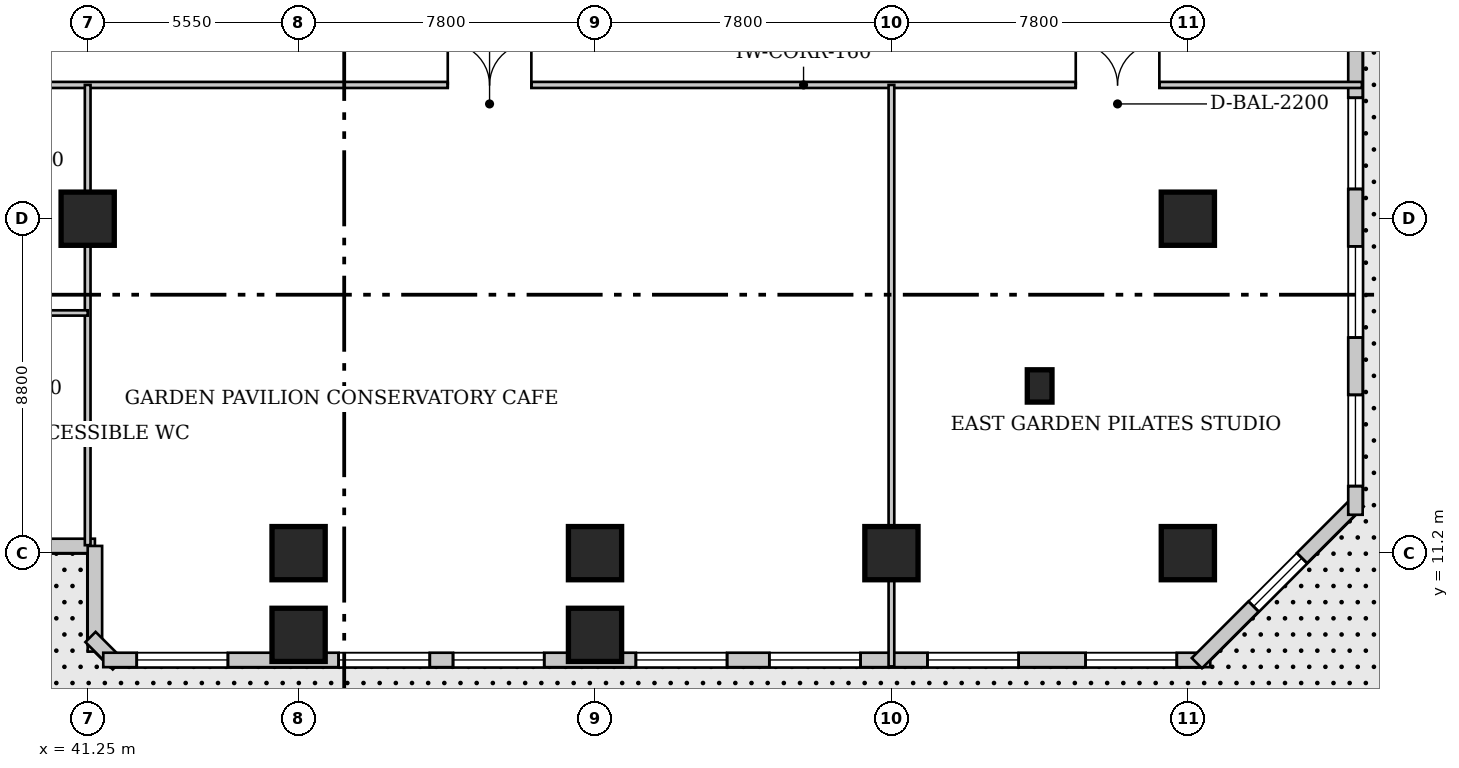
"""IFC4 building model, lengths in metres.
Left out: names, types, materials, properties, quantities, classifications, styles, units other than length and angle.
Written with IfcOpenShell. Run it as: python <this file> out.ifc"""

import sys

from ifc_helpers import new_model, si_unit, direction, frame, frame_2d, origin, origin_2d, place, context, subcontext, project, spatial, rectangle, extrude, element, fill, save


model = new_model("IFC4")
c1 = context("Model", 3, precision=1e-05, world=origin(), true_north=direction((0.0, 1.0)))
c2 = subcontext(c1, "Body", "Model", "MODEL_VIEW")
j1 = project(units=[si_unit("LENGTHUNIT", "METRE"), si_unit("PLANEANGLEUNIT", "RADIAN")], contexts=[c1])
p1 = place(None, origin())
s1 = spatial("IfcSite", under=j1, at=p1, CompositionType="ELEMENT")
p2 = place(p1, origin())
s2 = spatial("IfcBuilding", under=s1, at=p2, CompositionType="ELEMENT")
p3 = place(p2, frame((0.0, 0.0, 20.8)))
s3 = spatial("IfcBuildingStorey", under=s2, at=p3, CompositionType="ELEMENT", Elevation=20.8)
for number, where, z_axis, x_axis in (
    (1, (41.25, 20.0, 0.0), (0.0, 0.0, 1.0), (1.0, 0.0, 0.0)),
    (2, (46.8, 11.2, 0.0), (0.0, 0.0, 1.0), (1.0, 0.0, 0.0)),
    (3, (54.6, 11.2, 0.0), (0.0, 0.0, 1.0), (1.0, 0.0, 0.0)),
    (4, (62.4, 11.2, 0.0), (0.0, 0.0, 1.0), (1.0, 0.0, 0.0)),
    (5, (70.2, 11.2, 0.0), (0.0, 0.0, 1.0), (1.0, 0.0, 0.0)),
    (6, (70.2, 20.0, 0.0), (0.0, 0.0, 1.0), (1.0, 0.0, 0.0)),
    (7, (46.8, 9.05, 0.0), (0.0, 0.0, 1.0), (1.0, 0.0, 0.0)),
    (8, (54.6, 9.05, 0.0), (0.0, 0.0, 1.0), (1.0, 0.0, 0.0)),
):
    element("IfcColumn", number, at=place(p3, frame(where, z_axis=z_axis, x_axis=x_axis)), inside=s3, PredefinedType="COLUMN", context=c2, shape_type="SweptSolid", body=[
        extrude(rectangle(XDim=1.4, YDim=1.4, at=origin_2d()), origin(), (0.0, 0.0, 1.0), 5.2),
    ])
p4 = place(p3, frame((66.3, 15.6, 0.0), z_axis=(0.0, 0.0, 1.0), x_axis=(1.0, 0.0, 0.0)))
e9 = element("IfcColumn", 9, at=p4, inside=s3, PredefinedType="PILASTER", context=c2, shape_type="SweptSolid", body=[
    extrude(rectangle(XDim=0.65, YDim=0.85, at=origin_2d()), origin(), (0.0, 0.0, 1.0), 5.2),
])
p5 = place(p3, frame((36.56, 11.39, 0.0), z_axis=(0.0, 0.0, 1.0), x_axis=(1.0, 0.0, 0.0)))
e10 = element("IfcWall", 10, at=p5, inside=s3, PredefinedType="SOLIDWALL", context=c2, shape_type="SweptSolid", body=[
    extrude(rectangle(XDim=4.88, YDim=0.38, at=frame_2d((2.44, 0.0))), origin(), (0.0, 0.0, 1.0), 4.94),
])
p6 = place(p5, frame((1.54, 0.0, 0.8)))
e11 = element("IfcOpeningElement", 11, at=p6, cuts=e10, PredefinedType="OPENING", context=c2, shape_type="SweptSolid", body=[
    extrude(rectangle(XDim=1.8, YDim=2.1, at=frame_2d((0.9, 1.05))), frame((0.0, 0.2, 0.0), z_axis=(0.0, -1.0, 0.0), x_axis=(1.0, 0.0, 0.0)), (0.0, 0.0, 1.0), 0.4),
])
p7 = place(p3, frame((41.44, 11.39, 0.0), z_axis=(0.0, 0.0, 1.0), x_axis=(0.0, -1.0, 0.0)))
e12 = element("IfcWall", 12, at=p7, inside=s3, PredefinedType="SOLIDWALL", context=c2, shape_type="SweptSolid", body=[
    extrude(rectangle(XDim=2.78, YDim=0.38, at=frame_2d((1.39, 0.0))), origin(), (0.0, 0.0, 1.0), 4.94),
])
p8 = place(p3, frame((41.324, 8.994, 0.0), z_axis=(0.0, 0.0, 1.0), x_axis=(0.707106781187, -0.707106781187, 0.0)))
e13 = element("IfcWall", 13, at=p8, inside=s3, PredefinedType="SOLIDWALL", context=c2, shape_type="SweptSolid", body=[
    extrude(rectangle(XDim=1.019, YDim=0.38, at=frame_2d((0.509, 0.0))), origin(), (0.0, 0.0, 1.0), 4.94),
])
p9 = place(p3, frame((41.66, 8.39, 0.0), z_axis=(0.0, 0.0, 1.0), x_axis=(1.0, 0.0, 0.0)))
e14 = element("IfcWall", 14, at=p9, inside=s3, PredefinedType="SOLIDWALL", context=c2, shape_type="SweptSolid", body=[
    extrude(rectangle(XDim=29.13, YDim=0.38, at=frame_2d((14.565, 0.0))), origin(), (0.0, 0.0, 1.0), 4.94),
])
p10 = place(p9, frame((0.881, 0.0, 0.75)))
e15 = element("IfcOpeningElement", 15, at=p10, cuts=e14, PredefinedType="OPENING", context=c2, shape_type="SweptSolid", body=[
    extrude(rectangle(XDim=2.4, YDim=2.2, at=frame_2d((1.2, 1.1))), frame((0.0, 0.2, 0.0), z_axis=(0.0, -1.0, 0.0), x_axis=(1.0, 0.0, 0.0)), (0.0, 0.0, 1.0), 0.4),
])
p11 = place(p9, frame((6.192, 0.0, 0.75)))
e16 = element("IfcOpeningElement", 16, at=p11, cuts=e14, PredefinedType="OPENING", context=c2, shape_type="SweptSolid", body=[
    extrude(rectangle(XDim=2.4, YDim=2.2, at=frame_2d((1.2, 1.1))), frame((0.0, 0.2, 0.0), z_axis=(0.0, -1.0, 0.0), x_axis=(1.0, 0.0, 0.0)), (0.0, 0.0, 1.0), 0.4),
])
p12 = place(p9, frame((9.204, 0.0, 0.75)))
e17 = element("IfcOpeningElement", 17, at=p12, cuts=e14, PredefinedType="OPENING", context=c2, shape_type="SweptSolid", body=[
    extrude(rectangle(XDim=2.4, YDim=2.2, at=frame_2d((1.2, 1.1))), frame((0.0, 0.2, 0.0), z_axis=(0.0, -1.0, 0.0), x_axis=(1.0, 0.0, 0.0)), (0.0, 0.0, 1.0), 0.4),
])
p13 = place(p9, frame((14.015, 0.0, 0.75)))
e18 = element("IfcOpeningElement", 18, at=p13, cuts=e14, PredefinedType="OPENING", context=c2, shape_type="SweptSolid", body=[
    extrude(rectangle(XDim=2.4, YDim=2.2, at=frame_2d((1.2, 1.1))), frame((0.0, 0.2, 0.0), z_axis=(0.0, -1.0, 0.0), x_axis=(1.0, 0.0, 0.0)), (0.0, 0.0, 1.0), 0.4),
])
p14 = place(p9, frame((17.526, 0.0, 0.75)))
e19 = element("IfcOpeningElement", 19, at=p14, cuts=e14, PredefinedType="OPENING", context=c2, shape_type="SweptSolid", body=[
    extrude(rectangle(XDim=2.4, YDim=2.2, at=frame_2d((1.2, 1.1))), frame((0.0, 0.2, 0.0), z_axis=(0.0, -1.0, 0.0), x_axis=(1.0, 0.0, 0.0)), (0.0, 0.0, 1.0), 0.4),
])
p15 = place(p9, frame((21.688, 0.0, 0.75)))
e20 = element("IfcOpeningElement", 20, at=p15, cuts=e14, PredefinedType="OPENING", context=c2, shape_type="SweptSolid", body=[
    extrude(rectangle(XDim=2.4, YDim=2.2, at=frame_2d((1.2, 1.1))), frame((0.0, 0.2, 0.0), z_axis=(0.0, -1.0, 0.0), x_axis=(1.0, 0.0, 0.0)), (0.0, 0.0, 1.0), 0.4),
])
p16 = place(p9, frame((25.849, 0.0, 0.75)))
e21 = element("IfcOpeningElement", 21, at=p16, cuts=e14, PredefinedType="OPENING", context=c2, shape_type="SweptSolid", body=[
    extrude(rectangle(XDim=2.4, YDim=2.2, at=frame_2d((1.2, 1.1))), frame((0.0, 0.2, 0.0), z_axis=(0.0, -1.0, 0.0), x_axis=(1.0, 0.0, 0.0)), (0.0, 0.0, 1.0), 0.4),
])
p17 = place(p3, frame((70.438, 8.306, 0.0), z_axis=(0.0, 0.0, 1.0), x_axis=(0.707106781187, 0.707106781187, 0.0)))
e22 = element("IfcWall", 22, at=p17, inside=s3, PredefinedType="SOLIDWALL", context=c2, shape_type="SweptSolid", body=[
    extrude(rectangle(XDim=6.019, YDim=0.38, at=frame_2d((3.01, 0.0))), origin(), (0.0, 0.0, 1.0), 4.94),
])
p18 = place(p17, frame((2.11, 0.0, 0.8)))
e23 = element("IfcOpeningElement", 23, at=p18, cuts=e22, PredefinedType="OPENING", context=c2, shape_type="SweptSolid", body=[
    extrude(rectangle(XDim=1.8, YDim=2.1, at=frame_2d((0.9, 1.05))), frame((0.0, 0.2, 0.0), z_axis=(0.0, -1.0, 0.0), x_axis=(1.0, 0.0, 0.0)), (0.0, 0.0, 1.0), 0.4),
])
p19 = place(p3, frame((74.61, 12.21, 0.0), z_axis=(0.0, 0.0, 1.0), x_axis=(0.0, 1.0, 0.0)))
e24 = element("IfcWall", 24, at=p19, inside=s3, PredefinedType="SOLIDWALL", context=c2, shape_type="SweptSolid", body=[
    extrude(rectangle(XDim=35.18, YDim=0.38, at=frame_2d((17.59, 0.0))), origin(), (0.0, 0.0, 1.0), 4.94),
])
p20 = place(p19, frame((0.754, 0.0, 0.75)))
e25 = element("IfcOpeningElement", 25, at=p20, cuts=e24, PredefinedType="OPENING", context=c2, shape_type="SweptSolid", body=[
    extrude(rectangle(XDim=2.4, YDim=2.2, at=frame_2d((1.2, 1.1))), frame((0.0, 0.2, 0.0), z_axis=(0.0, -1.0, 0.0), x_axis=(1.0, 0.0, 0.0)), (0.0, 0.0, 1.0), 0.4),
])
p21 = place(p19, frame((4.663, 0.0, 0.75)))
e26 = element("IfcOpeningElement", 26, at=p21, cuts=e24, PredefinedType="OPENING", context=c2, shape_type="SweptSolid", body=[
    extrude(rectangle(XDim=2.4, YDim=2.2, at=frame_2d((1.2, 1.1))), frame((0.0, 0.2, 0.0), z_axis=(0.0, -1.0, 0.0), x_axis=(1.0, 0.0, 0.0)), (0.0, 0.0, 1.0), 0.4),
])
p22 = place(p19, frame((8.572, 0.0, 0.75)))
e27 = element("IfcOpeningElement", 27, at=p22, cuts=e24, PredefinedType="OPENING", context=c2, shape_type="SweptSolid", body=[
    extrude(rectangle(XDim=2.4, YDim=2.2, at=frame_2d((1.2, 1.1))), frame((0.0, 0.2, 0.0), z_axis=(0.0, -1.0, 0.0), x_axis=(1.0, 0.0, 0.0)), (0.0, 0.0, 1.0), 0.4),
])
p23 = place(p19, frame((16.39, 0.0, 0.75)))
e28 = element("IfcOpeningElement", 28, at=p23, cuts=e24, PredefinedType="OPENING", context=c2, shape_type="SweptSolid", body=[
    extrude(rectangle(XDim=2.4, YDim=2.2, at=frame_2d((1.2, 1.1))), frame((0.0, 0.2, 0.0), z_axis=(0.0, -1.0, 0.0), x_axis=(1.0, 0.0, 0.0)), (0.0, 0.0, 1.0), 0.4),
])
p24 = place(p19, frame((20.299, 0.0, 0.75)))
e29 = element("IfcOpeningElement", 29, at=p24, cuts=e24, PredefinedType="OPENING", context=c2, shape_type="SweptSolid", body=[
    extrude(rectangle(XDim=2.4, YDim=2.2, at=frame_2d((1.2, 1.1))), frame((0.0, 0.2, 0.0), z_axis=(0.0, -1.0, 0.0), x_axis=(1.0, 0.0, 0.0)), (0.0, 0.0, 1.0), 0.4),
])
p25 = place(p19, frame((24.208, 0.0, 0.75)))
e30 = element("IfcOpeningElement", 30, at=p25, cuts=e24, PredefinedType="OPENING", context=c2, shape_type="SweptSolid", body=[
    extrude(rectangle(XDim=2.4, YDim=2.2, at=frame_2d((1.2, 1.1))), frame((0.0, 0.2, 0.0), z_axis=(0.0, -1.0, 0.0), x_axis=(1.0, 0.0, 0.0)), (0.0, 0.0, 1.0), 0.4),
])
p26 = place(p19, frame((28.117, 0.0, 0.75)))
e31 = element("IfcOpeningElement", 31, at=p26, cuts=e24, PredefinedType="OPENING", context=c2, shape_type="SweptSolid", body=[
    extrude(rectangle(XDim=2.4, YDim=2.2, at=frame_2d((1.2, 1.1))), frame((0.0, 0.2, 0.0), z_axis=(0.0, -1.0, 0.0), x_axis=(1.0, 0.0, 0.0)), (0.0, 0.0, 1.0), 0.4),
])
p27 = place(p19, frame((32.026, 0.0, 0.75)))
e32 = element("IfcOpeningElement", 32, at=p27, cuts=e24, PredefinedType="OPENING", context=c2, shape_type="SweptSolid", body=[
    extrude(rectangle(XDim=2.4, YDim=2.2, at=frame_2d((1.2, 1.1))), frame((0.0, 0.2, 0.0), z_axis=(0.0, -1.0, 0.0), x_axis=(1.0, 0.0, 0.0)), (0.0, 0.0, 1.0), 0.4),
])
p28 = place(p3, frame((3.22, 23.52, 0.0), z_axis=(0.0, 0.0, 1.0), x_axis=(1.0, 0.0, 0.0)))
e33 = element("IfcWall", 33, at=p28, inside=s3, PredefinedType="PARTITIONING", context=c2, shape_type="SweptSolid", body=[
    extrude(rectangle(XDim=71.56, YDim=0.16, at=frame_2d((35.78, 0.0))), origin(), (0.0, 0.0, 1.0), 4.94),
])
p29 = place(p28, frame((2.19, 0.0, 0.0)))
e34 = element("IfcOpeningElement", 34, at=p29, cuts=e33, PredefinedType="OPENING", context=c2, shape_type="SweptSolid", body=[
    extrude(rectangle(XDim=1.0, YDim=2.15, at=frame_2d((0.5, 1.075))), frame((0.0, 0.09, 0.0), z_axis=(0.0, -1.0, 0.0), x_axis=(1.0, 0.0, 0.0)), (0.0, 0.0, 1.0), 0.18),
])
p30 = place(p28, frame((5.76, 0.0, 0.0)))
e35 = element("IfcOpeningElement", 35, at=p30, cuts=e33, PredefinedType="OPENING", context=c2, shape_type="SweptSolid", body=[
    extrude(rectangle(XDim=1.1, YDim=2.15, at=frame_2d((0.55, 1.075))), frame((0.0, 0.09, 0.0), z_axis=(0.0, -1.0, 0.0), x_axis=(1.0, 0.0, 0.0)), (0.0, 0.0, 1.0), 0.18),
])
p31 = place(p28, frame((9.005, 0.0, 0.0)))
e36 = element("IfcOpeningElement", 36, at=p31, cuts=e33, PredefinedType="OPENING", context=c2, shape_type="SweptSolid", body=[
    extrude(rectangle(XDim=0.95, YDim=2.1, at=frame_2d((0.475, 1.05))), frame((0.0, 0.09, 0.0), z_axis=(0.0, -1.0, 0.0), x_axis=(1.0, 0.0, 0.0)), (0.0, 0.0, 1.0), 0.18),
])
p32 = place(p28, frame((20.43, 0.0, 0.0)))
e37 = element("IfcOpeningElement", 37, at=p32, cuts=e33, PredefinedType="OPENING", context=c2, shape_type="SweptSolid", body=[
    extrude(rectangle(XDim=2.2, YDim=2.4, at=frame_2d((1.1, 1.2))), frame((0.0, 0.09, 0.0), z_axis=(0.0, -1.0, 0.0), x_axis=(1.0, 0.0, 0.0)), (0.0, 0.0, 1.0), 0.18),
])
p33 = place(p28, frame((29.055, 0.0, 0.0)))
e38 = element("IfcOpeningElement", 38, at=p33, cuts=e33, PredefinedType="OPENING", context=c2, shape_type="SweptSolid", body=[
    extrude(rectangle(XDim=2.2, YDim=2.4, at=frame_2d((1.1, 1.2))), frame((0.0, 0.09, 0.0), z_axis=(0.0, -1.0, 0.0), x_axis=(1.0, 0.0, 0.0)), (0.0, 0.0, 1.0), 0.18),
])
p34 = place(p28, frame((47.505, 0.0, 0.0)))
e39 = element("IfcOpeningElement", 39, at=p34, cuts=e33, PredefinedType="OPENING", context=c2, shape_type="SweptSolid", body=[
    extrude(rectangle(XDim=2.2, YDim=2.4, at=frame_2d((1.1, 1.2))), frame((0.0, 0.09, 0.0), z_axis=(0.0, -1.0, 0.0), x_axis=(1.0, 0.0, 0.0)), (0.0, 0.0, 1.0), 0.18),
])
p35 = place(p28, frame((64.03, 0.0, 0.0)))
e40 = element("IfcOpeningElement", 40, at=p35, cuts=e33, PredefinedType="OPENING", context=c2, shape_type="SweptSolid", body=[
    extrude(rectangle(XDim=2.2, YDim=2.4, at=frame_2d((1.1, 1.2))), frame((0.0, 0.09, 0.0), z_axis=(0.0, -1.0, 0.0), x_axis=(1.0, 0.0, 0.0)), (0.0, 0.0, 1.0), 0.18),
])
p36 = place(p28, frame((35.34, 0.0, 0.0)))
e41 = element("IfcOpeningElement", 41, at=p36, cuts=e33, PredefinedType="OPENING", context=c2, shape_type="SweptSolid", body=[
    extrude(rectangle(XDim=0.88, YDim=2.05, at=frame_2d((0.44, 1.025))), frame((0.0, 0.09, 0.0), z_axis=(0.0, -1.0, 0.0), x_axis=(1.0, 0.0, 0.0)), (0.0, 0.0, 1.0), 0.18),
])
p37 = place(p3, frame((41.25, 11.41, 0.0), z_axis=(0.0, 0.0, 1.0), x_axis=(0.0, 1.0, 0.0)))
e42 = element("IfcWall", 42, at=p37, inside=s3, PredefinedType="PARTITIONING", context=c2, shape_type="SweptSolid", body=[
    extrude(rectangle(XDim=12.11, YDim=0.15, at=frame_2d((6.055, 0.0))), origin(), (0.0, 0.0, 1.0), 4.94),
])
p38 = place(p3, frame((62.4, 8.22, 0.0), z_axis=(0.0, 0.0, 1.0), x_axis=(0.0, 1.0, 0.0)))
e43 = element("IfcWall", 43, at=p38, inside=s3, PredefinedType="PARTITIONING", context=c2, shape_type="SweptSolid", body=[
    extrude(rectangle(XDim=15.3, YDim=0.15, at=frame_2d((7.65, 0.0))), origin(), (0.0, 0.0, 1.0), 2.54),
])
p39 = place(p3, frame((36.75, 17.52, 0.0), z_axis=(0.0, 0.0, 1.0), x_axis=(1.0, 0.0, 0.0)))
e44 = element("IfcWall", 44, at=p39, inside=s3, PredefinedType="PLUMBINGWALL", context=c2, shape_type="SweptSolid", body=[
    extrude(rectangle(XDim=4.5, YDim=0.14, at=frame_2d((2.25, 0.0))), origin(), (0.0, 0.0, 1.0), 4.94),
])
p40 = place(p39, frame((1.76, 0.0, 0.0)))
e45 = element("IfcOpeningElement", 45, at=p40, cuts=e44, PredefinedType="OPENING", context=c2, shape_type="SweptSolid", body=[
    extrude(rectangle(XDim=0.88, YDim=2.05, at=frame_2d((0.44, 1.025))), frame((0.0, 0.08, 0.0), z_axis=(0.0, -1.0, 0.0), x_axis=(1.0, 0.0, 0.0)), (0.0, 0.0, 1.0), 0.16),
])
p41 = place(p10, origin())
e46 = element("IfcWindow", 46, at=p41, inside=s3, PartitioningType="SINGLE_PANEL", PredefinedType="WINDOW", context=c2, shape_type="SweptSolid", body=[
    extrude(rectangle(XDim=2.4, YDim=2.2, at=frame_2d((1.2, 1.1))), frame((0.0, 0.03, 0.0), z_axis=(0.0, -1.0, 0.0), x_axis=(1.0, 0.0, 0.0)), (0.0, 0.0, 1.0), 0.06),
])
fill(e15, e46)
p42 = place(p11, origin())
e47 = element("IfcWindow", 47, at=p42, inside=s3, PartitioningType="SINGLE_PANEL", PredefinedType="WINDOW", context=c2, shape_type="SweptSolid", body=[
    extrude(rectangle(XDim=2.4, YDim=2.2, at=frame_2d((1.2, 1.1))), frame((0.0, 0.03, 0.0), z_axis=(0.0, -1.0, 0.0), x_axis=(1.0, 0.0, 0.0)), (0.0, 0.0, 1.0), 0.06),
])
fill(e16, e47)
p43 = place(p12, origin())
e48 = element("IfcWindow", 48, at=p43, inside=s3, PartitioningType="SINGLE_PANEL", PredefinedType="WINDOW", context=c2, shape_type="SweptSolid", body=[
    extrude(rectangle(XDim=2.4, YDim=2.2, at=frame_2d((1.2, 1.1))), frame((0.0, 0.03, 0.0), z_axis=(0.0, -1.0, 0.0), x_axis=(1.0, 0.0, 0.0)), (0.0, 0.0, 1.0), 0.06),
])
fill(e17, e48)
p44 = place(p13, origin())
e49 = element("IfcWindow", 49, at=p44, inside=s3, PartitioningType="SINGLE_PANEL", PredefinedType="WINDOW", context=c2, shape_type="SweptSolid", body=[
    extrude(rectangle(XDim=2.4, YDim=2.2, at=frame_2d((1.2, 1.1))), frame((0.0, 0.03, 0.0), z_axis=(0.0, -1.0, 0.0), x_axis=(1.0, 0.0, 0.0)), (0.0, 0.0, 1.0), 0.06),
])
fill(e18, e49)
p45 = place(p14, origin())
e50 = element("IfcWindow", 50, at=p45, inside=s3, PartitioningType="SINGLE_PANEL", PredefinedType="WINDOW", context=c2, shape_type="SweptSolid", body=[
    extrude(rectangle(XDim=2.4, YDim=2.2, at=frame_2d((1.2, 1.1))), frame((0.0, 0.03, 0.0), z_axis=(0.0, -1.0, 0.0), x_axis=(1.0, 0.0, 0.0)), (0.0, 0.0, 1.0), 0.06),
])
fill(e19, e50)
p46 = place(p15, origin())
e51 = element("IfcWindow", 51, at=p46, inside=s3, PartitioningType="SINGLE_PANEL", PredefinedType="WINDOW", context=c2, shape_type="SweptSolid", body=[
    extrude(rectangle(XDim=2.4, YDim=2.2, at=frame_2d((1.2, 1.1))), frame((0.0, 0.03, 0.0), z_axis=(0.0, -1.0, 0.0), x_axis=(1.0, 0.0, 0.0)), (0.0, 0.0, 1.0), 0.06),
])
fill(e20, e51)
p47 = place(p16, origin())
e52 = element("IfcWindow", 52, at=p47, inside=s3, PartitioningType="SINGLE_PANEL", PredefinedType="WINDOW", context=c2, shape_type="SweptSolid", body=[
    extrude(rectangle(XDim=2.4, YDim=2.2, at=frame_2d((1.2, 1.1))), frame((0.0, 0.03, 0.0), z_axis=(0.0, -1.0, 0.0), x_axis=(1.0, 0.0, 0.0)), (0.0, 0.0, 1.0), 0.06),
])
fill(e21, e52)
p48 = place(p18, origin())
e53 = element("IfcWindow", 53, at=p48, inside=s3, PartitioningType="SINGLE_PANEL", PredefinedType="WINDOW", context=c2, shape_type="SweptSolid", body=[
    extrude(rectangle(XDim=1.8, YDim=2.1, at=frame_2d((0.9, 1.05))), frame((0.0, 0.03, 0.0), z_axis=(0.0, -1.0, 0.0), x_axis=(1.0, 0.0, 0.0)), (0.0, 0.0, 1.0), 0.06),
])
fill(e23, e53)
p49 = place(p20, origin())
e54 = element("IfcWindow", 54, at=p49, inside=s3, PartitioningType="SINGLE_PANEL", PredefinedType="WINDOW", context=c2, shape_type="SweptSolid", body=[
    extrude(rectangle(XDim=2.4, YDim=2.2, at=frame_2d((1.2, 1.1))), frame((0.0, 0.03, 0.0), z_axis=(0.0, -1.0, 0.0), x_axis=(1.0, 0.0, 0.0)), (0.0, 0.0, 1.0), 0.06),
])
fill(e25, e54)
p50 = place(p21, origin())
e55 = element("IfcWindow", 55, at=p50, inside=s3, PartitioningType="SINGLE_PANEL", PredefinedType="WINDOW", context=c2, shape_type="SweptSolid", body=[
    extrude(rectangle(XDim=2.4, YDim=2.2, at=frame_2d((1.2, 1.1))), frame((0.0, 0.03, 0.0), z_axis=(0.0, -1.0, 0.0), x_axis=(1.0, 0.0, 0.0)), (0.0, 0.0, 1.0), 0.06),
])
fill(e26, e55)
p51 = place(p22, origin())
e56 = element("IfcWindow", 56, at=p51, inside=s3, PartitioningType="SINGLE_PANEL", PredefinedType="WINDOW", context=c2, shape_type="SweptSolid", body=[
    extrude(rectangle(XDim=2.4, YDim=2.2, at=frame_2d((1.2, 1.1))), frame((0.0, 0.03, 0.0), z_axis=(0.0, -1.0, 0.0), x_axis=(1.0, 0.0, 0.0)), (0.0, 0.0, 1.0), 0.06),
])
fill(e27, e56)
p52 = place(p34, origin())
e57 = element("IfcDoor", 57, at=p52, inside=s3, OperationType="DOUBLE_DOOR_SINGLE_SWING", PredefinedType="DOOR", context=c2, shape_type="SweptSolid", body=[
    extrude(rectangle(XDim=2.2, YDim=2.4, at=frame_2d((1.1, 1.2))), frame((0.0, 0.025, 0.0), z_axis=(0.0, -1.0, 0.0), x_axis=(1.0, 0.0, 0.0)), (0.0, 0.0, 1.0), 0.05),
])
fill(e39, e57)
p53 = place(p35, origin())
e58 = element("IfcDoor", 58, at=p53, inside=s3, OperationType="DOUBLE_DOOR_SINGLE_SWING", PredefinedType="DOOR", context=c2, shape_type="SweptSolid", body=[
    extrude(rectangle(XDim=2.2, YDim=2.4, at=frame_2d((1.1, 1.2))), frame((0.0, 0.025, 0.0), z_axis=(0.0, -1.0, 0.0), x_axis=(1.0, 0.0, 0.0)), (0.0, 0.0, 1.0), 0.05),
])
fill(e40, e58)
save(model, sys.argv[1])
